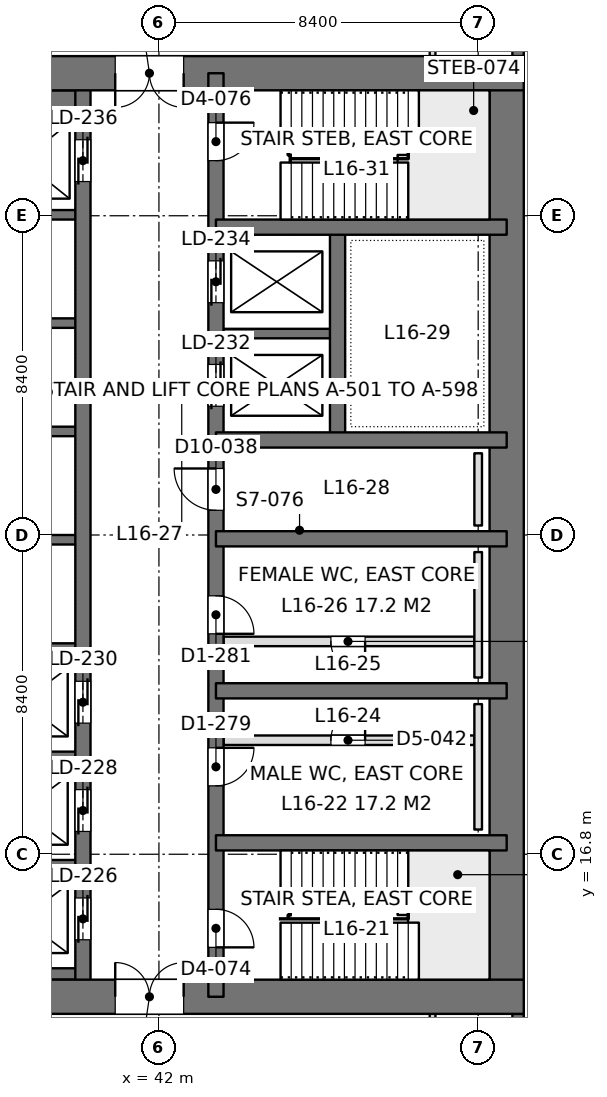
"""IFC4 building model, lengths in metres.
Left out: names, types, materials, properties, quantities, classifications, styles, units other than length and angle.
Written with IfcOpenShell. Run it as: python <this file> out.ifc"""

import sys

from ifc_helpers import new_model, si_unit, direction, frame, frame_2d, origin, place, context, subcontext, project, spatial, rectangle, extrude, element, fill, save


model = new_model("IFC4")
c1 = context("Model", 3, precision=1e-05, world=origin(), true_north=direction((0.0, 1.0)))
c2 = subcontext(c1, "Body", "Model", "MODEL_VIEW")
j1 = project(units=[si_unit("LENGTHUNIT", "METRE"), si_unit("PLANEANGLEUNIT", "RADIAN")], contexts=[c1])
p1 = place(None, origin())
s1 = spatial("IfcSite", under=j1, at=p1, CompositionType="ELEMENT")
p2 = place(p1, origin())
s2 = spatial("IfcBuilding", under=s1, at=p2, CompositionType="ELEMENT")
p3 = place(p2, frame((0.0, 0.0, 72.9)))
s3 = spatial("IfcBuildingStorey", under=s2, at=p3, CompositionType="ELEMENT", Elevation=72.9)
p4 = place(p3, frame((33.6, 13.05, 0.0), z_axis=(0.0, 0.0, 1.0), x_axis=(1.0, 0.0, 0.0)))
e1 = element("IfcWall", 1, at=p4, inside=s3, PredefinedType="SHEAR", context=c2, shape_type="SweptSolid", body=[
    extrude(rectangle(XDim=18.0, YDim=0.9, at=frame_2d((9.0, 0.0))), origin(), (0.0, 0.0, 1.0), 4.5),
])
p5 = place(p4, frame((7.25, 0.0, 0.0)))
e2 = element("IfcOpeningElement", 2, at=p5, cuts=e1, PredefinedType="OPENING", context=c2, shape_type="SweptSolid", body=[
    extrude(rectangle(XDim=1.8, YDim=2.4, at=frame_2d((0.9, 1.2))), frame((0.0, 0.46, 0.0), z_axis=(0.0, -1.0, 0.0), x_axis=(1.0, 0.0, 0.0)), (0.0, 0.0, 1.0), 0.92),
])
p6 = place(p3, frame((33.6, 37.35, 0.0), z_axis=(0.0, 0.0, 1.0), x_axis=(1.0, 0.0, 0.0)))
e3 = element("IfcWall", 3, at=p6, inside=s3, PredefinedType="SHEAR", context=c2, shape_type="SweptSolid", body=[
    extrude(rectangle(XDim=18.0, YDim=0.9, at=frame_2d((9.0, 0.0))), origin(), (0.0, 0.0, 1.0), 4.5),
])
p7 = place(p6, frame((7.25, 0.0, 0.0)))
e4 = element("IfcOpeningElement", 4, at=p7, cuts=e3, PredefinedType="OPENING", context=c2, shape_type="SweptSolid", body=[
    extrude(rectangle(XDim=1.8, YDim=2.4, at=frame_2d((0.9, 1.2))), frame((0.0, 0.46, 0.0), z_axis=(0.0, -1.0, 0.0), x_axis=(1.0, 0.0, 0.0)), (0.0, 0.0, 1.0), 0.92),
])
p8 = place(p3, frame((51.15, 13.05, 0.0), z_axis=(0.0, 0.0, 1.0), x_axis=(0.0, 1.0, 0.0)))
e5 = element("IfcWall", 5, at=p8, inside=s3, PredefinedType="SHEAR", context=c2, shape_type="SweptSolid", body=[
    extrude(rectangle(XDim=24.3, YDim=0.9, at=frame_2d((12.15, 0.0))), origin(), (0.0, 0.0, 1.0), 4.5),
])
p9 = place(p3, frame((43.5, 13.05, 0.0), z_axis=(0.0, 0.0, 1.0), x_axis=(0.0, 1.0, 0.0)))
e6 = element("IfcWall", 6, at=p9, inside=s3, PredefinedType="SHEAR", context=c2, shape_type="SweptSolid", body=[
    extrude(rectangle(XDim=24.3, YDim=0.4, at=frame_2d((12.15, 0.0))), origin(), (0.0, 0.0, 1.0), 4.5),
])
p10 = place(p9, frame((1.3, 0.0, 0.0)))
e7 = element("IfcOpeningElement", 7, at=p10, cuts=e6, PredefinedType="OPENING", context=c2, shape_type="SweptSolid", body=[
    extrude(rectangle(XDim=1.0, YDim=2.2, at=frame_2d((0.5, 1.1))), frame((0.0, 0.21, 0.0), z_axis=(0.0, -1.0, 0.0), x_axis=(1.0, 0.0, 0.0)), (0.0, 0.0, 1.0), 0.42),
])
p11 = place(p9, frame((22.0, 0.0, 0.0)))
e8 = element("IfcOpeningElement", 8, at=p11, cuts=e6, PredefinedType="OPENING", context=c2, shape_type="SweptSolid", body=[
    extrude(rectangle(XDim=1.0, YDim=2.2, at=frame_2d((0.5, 1.1))), frame((0.0, 0.21, 0.0), z_axis=(0.0, -1.0, 0.0), x_axis=(1.0, 0.0, 0.0)), (0.0, 0.0, 1.0), 0.42),
])
p12 = place(p9, frame((5.55, 0.0, 0.0)))
e9 = element("IfcOpeningElement", 9, at=p12, cuts=e6, PredefinedType="OPENING", context=c2, shape_type="SweptSolid", body=[
    extrude(rectangle(XDim=1.0, YDim=2.2, at=frame_2d((0.5, 1.1))), frame((0.0, 0.21, 0.0), z_axis=(0.0, -1.0, 0.0), x_axis=(1.0, 0.0, 0.0)), (0.0, 0.0, 1.0), 0.42),
])
p13 = place(p9, frame((9.55, 0.0, 0.0)))
e10 = element("IfcOpeningElement", 10, at=p13, cuts=e6, PredefinedType="OPENING", context=c2, shape_type="SweptSolid", body=[
    extrude(rectangle(XDim=1.0, YDim=2.2, at=frame_2d((0.5, 1.1))), frame((0.0, 0.21, 0.0), z_axis=(0.0, -1.0, 0.0), x_axis=(1.0, 0.0, 0.0)), (0.0, 0.0, 1.0), 0.42),
])
p14 = place(p9, frame((12.8, 0.0, 0.0)))
e11 = element("IfcOpeningElement", 11, at=p14, cuts=e6, PredefinedType="OPENING", context=c2, shape_type="SweptSolid", body=[
    extrude(rectangle(XDim=1.1, YDim=2.2, at=frame_2d((0.55, 1.1))), frame((0.0, 0.21, 0.0), z_axis=(0.0, -1.0, 0.0), x_axis=(1.0, 0.0, 0.0)), (0.0, 0.0, 1.0), 0.42),
])
p15 = place(p9, frame((15.538, 0.0, 0.0)))
e12 = element("IfcOpeningElement", 12, at=p15, cuts=e6, PredefinedType="OPENING", context=c2, shape_type="SweptSolid", body=[
    extrude(rectangle(XDim=1.1, YDim=2.2, at=frame_2d((0.55, 1.1))), frame((0.0, 0.21, 0.0), z_axis=(0.0, -1.0, 0.0), x_axis=(1.0, 0.0, 0.0)), (0.0, 0.0, 1.0), 0.42),
])
p16 = place(p9, frame((18.262, 0.0, 0.0)))
e13 = element("IfcOpeningElement", 13, at=p16, cuts=e6, PredefinedType="OPENING", context=c2, shape_type="SweptSolid", body=[
    extrude(rectangle(XDim=1.1, YDim=2.2, at=frame_2d((0.55, 1.1))), frame((0.0, 0.21, 0.0), z_axis=(0.0, -1.0, 0.0), x_axis=(1.0, 0.0, 0.0)), (0.0, 0.0, 1.0), 0.42),
])
p17 = place(p3, frame((40.0, 13.05, 0.0), z_axis=(0.0, 0.0, 1.0), x_axis=(0.0, 1.0, 0.0)))
e14 = element("IfcWall", 14, at=p17, inside=s3, PredefinedType="SHEAR", context=c2, shape_type="SweptSolid", body=[
    extrude(rectangle(XDim=24.3, YDim=0.4, at=frame_2d((12.15, 0.0))), origin(), (0.0, 0.0, 1.0), 4.5),
])
p18 = place(p17, frame((1.5, 0.0, 0.0)))
e15 = element("IfcOpeningElement", 15, at=p18, cuts=e14, PredefinedType="OPENING", context=c2, shape_type="SweptSolid", body=[
    extrude(rectangle(XDim=1.1, YDim=2.2, at=frame_2d((0.55, 1.1))), frame((0.0, 0.21, 0.0), z_axis=(0.0, -1.0, 0.0), x_axis=(1.0, 0.0, 0.0)), (0.0, 0.0, 1.0), 0.42),
])
p19 = place(p17, frame((4.35, 0.0, 0.0)))
e16 = element("IfcOpeningElement", 16, at=p19, cuts=e14, PredefinedType="OPENING", context=c2, shape_type="SweptSolid", body=[
    extrude(rectangle(XDim=1.1, YDim=2.2, at=frame_2d((0.55, 1.1))), frame((0.0, 0.21, 0.0), z_axis=(0.0, -1.0, 0.0), x_axis=(1.0, 0.0, 0.0)), (0.0, 0.0, 1.0), 0.42),
])
p20 = place(p17, frame((7.2, 0.0, 0.0)))
e17 = element("IfcOpeningElement", 17, at=p20, cuts=e14, PredefinedType="OPENING", context=c2, shape_type="SweptSolid", body=[
    extrude(rectangle(XDim=1.1, YDim=2.2, at=frame_2d((0.55, 1.1))), frame((0.0, 0.21, 0.0), z_axis=(0.0, -1.0, 0.0), x_axis=(1.0, 0.0, 0.0)), (0.0, 0.0, 1.0), 0.42),
])
p21 = place(p17, frame((21.45, 0.0, 0.0)))
e18 = element("IfcOpeningElement", 18, at=p21, cuts=e14, PredefinedType="OPENING", context=c2, shape_type="SweptSolid", body=[
    extrude(rectangle(XDim=1.1, YDim=2.2, at=frame_2d((0.55, 1.1))), frame((0.0, 0.21, 0.0), z_axis=(0.0, -1.0, 0.0), x_axis=(1.0, 0.0, 0.0)), (0.0, 0.0, 1.0), 0.42),
])
for number, where, z_axis, x_axis in (
    (19, (51.15, 17.1, 0.0), (0.0, 0.0, 1.0), (-1.0, 0.0, 0.0)),
    (20, (51.15, 21.1, 0.0), (0.0, 0.0, 1.0), (-1.0, 0.0, 0.0)),
    (21, (51.15, 25.1, 0.0), (0.0, 0.0, 1.0), (-1.0, 0.0, 0.0)),
    (22, (51.15, 27.7, 0.0), (0.0, 0.0, 1.0), (-1.0, 0.0, 0.0)),
    (23, (51.15, 33.3, 0.0), (0.0, 0.0, 1.0), (-1.0, 0.0, 0.0)),
):
    element("IfcWall", number, at=place(p3, frame(where, z_axis=z_axis, x_axis=x_axis)), inside=s3, PredefinedType="SHEAR", context=c2, shape_type="SweptSolid", body=[
        extrude(rectangle(XDim=7.65, YDim=0.4, at=frame_2d((3.825, 0.0))), origin(), (0.0, 0.0, 1.0), 4.5),
    ])
p22 = place(p3, frame((46.7, 27.7, 0.0), z_axis=(0.0, 0.0, 1.0), x_axis=(0.0, 1.0, 0.0)))
e24 = element("IfcWall", 24, at=p22, inside=s3, PredefinedType="SHEAR", context=c2, shape_type="SweptSolid", body=[
    extrude(rectangle(XDim=5.6, YDim=0.4, at=frame_2d((2.8, 0.0))), origin(), (0.0, 0.0, 1.0), 4.5),
])
p23 = place(p3, frame((46.7, 30.5, 0.0), z_axis=(0.0, 0.0, 1.0), x_axis=(-1.0, 0.0, 0.0)))
e25 = element("IfcWall", 25, at=p23, inside=s3, PredefinedType="SHEAR", context=c2, shape_type="SweptSolid", body=[
    extrude(rectangle(XDim=3.2, YDim=0.25, at=frame_2d((1.6, 0.0))), origin(), (0.0, 0.0, 1.0), 4.5),
])
p24 = place(p3, frame((40.0, 13.65, 0.0), z_axis=(0.0, 0.0, 1.0), x_axis=(-1.0, 0.0, 0.0)))
e26 = element("IfcWall", 26, at=p24, inside=s3, PredefinedType="SHEAR", context=c2, shape_type="SweptSolid", body=[
    extrude(rectangle(XDim=3.2, YDim=0.3, at=frame_2d((1.6, 0.0))), origin(), (0.0, 0.0, 1.0), 4.5),
])
for number, where, z_axis, x_axis in (
    (27, (40.0, 16.525, 0.0), (0.0, 0.0, 1.0), (-1.0, 0.0, 0.0)),
    (28, (40.0, 19.375, 0.0), (0.0, 0.0, 1.0), (-1.0, 0.0, 0.0)),
    (29, (40.0, 22.225, 0.0), (0.0, 0.0, 1.0), (-1.0, 0.0, 0.0)),
    (30, (40.0, 25.075, 0.0), (0.0, 0.0, 1.0), (-1.0, 0.0, 0.0)),
    (31, (40.0, 27.925, 0.0), (0.0, 0.0, 1.0), (-1.0, 0.0, 0.0)),
    (32, (40.0, 30.775, 0.0), (0.0, 0.0, 1.0), (-1.0, 0.0, 0.0)),
    (33, (40.0, 33.625, 0.0), (0.0, 0.0, 1.0), (-1.0, 0.0, 0.0)),
):
    element("IfcWall", number, at=place(p3, frame(where, z_axis=z_axis, x_axis=x_axis)), inside=s3, PredefinedType="SHEAR", context=c2, shape_type="SweptSolid", body=[
        extrude(rectangle(XDim=3.2, YDim=0.25, at=frame_2d((1.6, 0.0))), origin(), (0.0, 0.0, 1.0), 4.5),
    ])
p25 = place(p3, frame((40.0, 36.625, 0.0), z_axis=(0.0, 0.0, 1.0), x_axis=(-1.0, 0.0, 0.0)))
e34 = element("IfcWall", 34, at=p25, inside=s3, PredefinedType="SHEAR", context=c2, shape_type="SweptSolid", body=[
    extrude(rectangle(XDim=3.2, YDim=0.55, at=frame_2d((1.6, 0.0))), origin(), (0.0, 0.0, 1.0), 4.5),
])
p26 = place(p3, frame((51.45, 42.0, 0.0), z_axis=(0.0, 0.0, 1.0), x_axis=(0.0, -1.0, 0.0)))
e35 = element("IfcWall", 35, at=p26, inside=s3, PredefinedType="SOLIDWALL", context=c2, shape_type="SweptSolid", body=[
    extrude(rectangle(XDim=4.2, YDim=0.3, at=frame_2d((2.1, 0.0))), origin(), (0.0, 0.0, 1.0), 4.34),
])
p27 = place(p26, frame((0.9, 0.0, 0.9)))
e36 = element("IfcOpeningElement", 36, at=p27, cuts=e35, PredefinedType="OPENING", context=c2, shape_type="SweptSolid", body=[
    extrude(rectangle(XDim=2.4, YDim=1.9, at=frame_2d((1.2, 0.95))), frame((0.0, 0.16, 0.0), z_axis=(0.0, -1.0, 0.0), x_axis=(1.0, 0.0, 0.0)), (0.0, 0.0, 1.0), 0.32),
])
p28 = place(p3, frame((51.45, 12.6, 0.0), z_axis=(0.0, 0.0, 1.0), x_axis=(0.0, -1.0, 0.0)))
e37 = element("IfcWall", 37, at=p28, inside=s3, PredefinedType="SOLIDWALL", context=c2, shape_type="SweptSolid", body=[
    extrude(rectangle(XDim=4.2, YDim=0.3, at=frame_2d((2.1, 0.0))), origin(), (0.0, 0.0, 1.0), 4.34),
])
p29 = place(p28, frame((0.9, 0.0, 0.9)))
e38 = element("IfcOpeningElement", 38, at=p29, cuts=e37, PredefinedType="OPENING", context=c2, shape_type="SweptSolid", body=[
    extrude(rectangle(XDim=2.4, YDim=1.9, at=frame_2d((1.2, 0.95))), frame((0.0, 0.16, 0.0), z_axis=(0.0, -1.0, 0.0), x_axis=(1.0, 0.0, 0.0)), (0.0, 0.0, 1.0), 0.32),
])
p30 = place(p3, frame((49.2, 10.8, 0.0), z_axis=(0.0, 0.0, 1.0), x_axis=(0.0, 1.0, 0.0)))
e39 = element("IfcWall", 39, at=p30, inside=s3, PredefinedType="PARTITIONING", context=c2, shape_type="SweptSolid", body=[
    extrude(rectangle(XDim=1.802, YDim=0.15, at=frame_2d((0.901, 0.0))), origin(), (0.0, 0.0, 1.0), 4.34),
])
p31 = place(p3, frame((49.2, 37.8, 0.0), z_axis=(0.0, 0.0, 1.0), x_axis=(0.0, 1.0, 0.0)))
e40 = element("IfcWall", 40, at=p31, inside=s3, PredefinedType="PARTITIONING", context=c2, shape_type="SweptSolid", body=[
    extrude(rectangle(XDim=1.8, YDim=0.15, at=frame_2d((0.9, 0.0))), origin(), (0.0, 0.0, 1.0), 4.34),
])
p32 = place(p3, frame((43.7, 22.4, 0.0), z_axis=(0.0, 0.0, 1.0), x_axis=(1.0, 0.0, 0.0)))
e41 = element("IfcWall", 41, at=p32, inside=s3, PredefinedType="PARTITIONING", context=c2, shape_type="SweptSolid", body=[
    extrude(rectangle(XDim=6.6, YDim=0.25, at=frame_2d((3.3, 0.0))), origin(), (0.0, 0.0, 1.0), 4.3),
])
p33 = place(p32, frame((2.825, 0.0, 0.0)))
e42 = element("IfcOpeningElement", 42, at=p33, cuts=e41, PredefinedType="OPENING", context=c2, shape_type="SweptSolid", body=[
    extrude(rectangle(XDim=0.9, YDim=2.2, at=frame_2d((0.45, 1.1))), frame((0.0, 0.135, 0.0), z_axis=(0.0, -1.0, 0.0), x_axis=(1.0, 0.0, 0.0)), (0.0, 0.0, 1.0), 0.27),
])
p34 = place(p3, frame((43.7, 19.8, 0.0), z_axis=(0.0, 0.0, 1.0), x_axis=(1.0, 0.0, 0.0)))
e43 = element("IfcWall", 43, at=p34, inside=s3, PredefinedType="PARTITIONING", context=c2, shape_type="SweptSolid", body=[
    extrude(rectangle(XDim=6.6, YDim=0.25, at=frame_2d((3.3, 0.0))), origin(), (0.0, 0.0, 1.0), 4.3),
])
p35 = place(p34, frame((2.825, 0.0, 0.0)))
e44 = element("IfcOpeningElement", 44, at=p35, cuts=e43, PredefinedType="OPENING", context=c2, shape_type="SweptSolid", body=[
    extrude(rectangle(XDim=0.9, YDim=2.2, at=frame_2d((0.45, 1.1))), frame((0.0, 0.135, 0.0), z_axis=(0.0, -1.0, 0.0), x_axis=(1.0, 0.0, 0.0)), (0.0, 0.0, 1.0), 0.27),
])
for number, where, z_axis, x_axis in (
    (45, (50.4, 17.45, 0.0), (0.0, 0.0, 1.0), (0.0, 1.0, 0.0)),
    (46, (50.4, 21.45, 0.0), (0.0, 0.0, 1.0), (0.0, 1.0, 0.0)),
):
    element("IfcWall", number, at=place(p3, frame(where, z_axis=z_axis, x_axis=x_axis)), inside=s3, PredefinedType="PLUMBINGWALL", context=c2, shape_type="SweptSolid", body=[
        extrude(rectangle(XDim=3.3, YDim=0.2, at=frame_2d((1.65, 0.0))), origin(), (0.0, 0.0, 1.0), 1.2),
    ])
p36 = place(p3, frame((50.4, 25.45, 0.0), z_axis=(0.0, 0.0, 1.0), x_axis=(0.0, 1.0, 0.0)))
e47 = element("IfcWall", 47, at=p36, inside=s3, PredefinedType="PLUMBINGWALL", context=c2, shape_type="SweptSolid", body=[
    extrude(rectangle(XDim=1.9, YDim=0.2, at=frame_2d((0.95, 0.0))), origin(), (0.0, 0.0, 1.0), 1.2),
])
p37 = place(p5, origin())
e48 = element("IfcDoor", 48, at=p37, inside=s3, OperationType="DOUBLE_DOOR_SINGLE_SWING", PredefinedType="DOOR", context=c2, shape_type="SweptSolid", body=[
    extrude(rectangle(XDim=1.8, YDim=2.4, at=frame_2d((0.9, 1.2))), frame((0.0, 0.025, 0.0), z_axis=(0.0, -1.0, 0.0), x_axis=(1.0, 0.0, 0.0)), (0.0, 0.0, 1.0), 0.05),
])
fill(e2, e48)
p38 = place(p7, frame((1.8, 0.0, 0.0), z_axis=(0.0, 0.0, 1.0), x_axis=(-1.0, 0.0, 0.0)))
e49 = element("IfcDoor", 49, at=p38, inside=s3, OperationType="DOUBLE_DOOR_SINGLE_SWING", PredefinedType="DOOR", context=c2, shape_type="SweptSolid", body=[
    extrude(rectangle(XDim=1.8, YDim=2.4, at=frame_2d((0.9, 1.2))), frame((0.0, 0.025, 0.0), z_axis=(0.0, -1.0, 0.0), x_axis=(1.0, 0.0, 0.0)), (0.0, 0.0, 1.0), 0.05),
])
fill(e4, e49)
p39 = place(p10, frame((1.0, 0.0, 0.0), z_axis=(0.0, 0.0, 1.0), x_axis=(-1.0, 0.0, 0.0)))
e50 = element("IfcDoor", 50, at=p39, inside=s3, OperationType="SINGLE_SWING_RIGHT", PredefinedType="DOOR", context=c2, shape_type="SweptSolid", body=[
    extrude(rectangle(XDim=1.0, YDim=2.2, at=frame_2d((0.5, 1.1))), frame((0.0, 0.025, 0.0), z_axis=(0.0, -1.0, 0.0), x_axis=(1.0, 0.0, 0.0)), (0.0, 0.0, 1.0), 0.05),
])
fill(e7, e50)
p40 = place(p11, frame((1.0, 0.0, 0.0), z_axis=(0.0, 0.0, 1.0), x_axis=(-1.0, 0.0, 0.0)))
e51 = element("IfcDoor", 51, at=p40, inside=s3, OperationType="SINGLE_SWING_LEFT", PredefinedType="DOOR", context=c2, shape_type="SweptSolid", body=[
    extrude(rectangle(XDim=1.0, YDim=2.2, at=frame_2d((0.5, 1.1))), frame((0.0, 0.025, 0.0), z_axis=(0.0, -1.0, 0.0), x_axis=(1.0, 0.0, 0.0)), (0.0, 0.0, 1.0), 0.05),
])
fill(e8, e51)
p41 = place(p12, frame((1.0, 0.0, 0.0), z_axis=(0.0, 0.0, 1.0), x_axis=(-1.0, 0.0, 0.0)))
e52 = element("IfcDoor", 52, at=p41, inside=s3, OperationType="SINGLE_SWING_LEFT", PredefinedType="DOOR", context=c2, shape_type="SweptSolid", body=[
    extrude(rectangle(XDim=1.0, YDim=2.2, at=frame_2d((0.5, 1.1))), frame((0.0, 0.025, 0.0), z_axis=(0.0, -1.0, 0.0), x_axis=(1.0, 0.0, 0.0)), (0.0, 0.0, 1.0), 0.05),
])
fill(e9, e52)
p42 = place(p13, frame((1.0, 0.0, 0.0), z_axis=(0.0, 0.0, 1.0), x_axis=(-1.0, 0.0, 0.0)))
e53 = element("IfcDoor", 53, at=p42, inside=s3, OperationType="SINGLE_SWING_RIGHT", PredefinedType="DOOR", context=c2, shape_type="SweptSolid", body=[
    extrude(rectangle(XDim=1.0, YDim=2.2, at=frame_2d((0.5, 1.1))), frame((0.0, 0.025, 0.0), z_axis=(0.0, -1.0, 0.0), x_axis=(1.0, 0.0, 0.0)), (0.0, 0.0, 1.0), 0.05),
])
fill(e10, e53)
p43 = place(p14, origin())
e54 = element("IfcDoor", 54, at=p43, inside=s3, OperationType="SINGLE_SWING_RIGHT", PredefinedType="DOOR", context=c2, shape_type="SweptSolid", body=[
    extrude(rectangle(XDim=1.1, YDim=2.2, at=frame_2d((0.55, 1.1))), frame((0.0, 0.025, 0.0), z_axis=(0.0, -1.0, 0.0), x_axis=(1.0, 0.0, 0.0)), (0.0, 0.0, 1.0), 0.05),
])
fill(e11, e54)
p44 = place(p18, origin())
e55 = element("IfcDoor", 55, at=p44, inside=s3, OperationType="DOUBLE_DOOR_SLIDING", PredefinedType="DOOR", context=c2, shape_type="SweptSolid", body=[
    extrude(rectangle(XDim=1.1, YDim=2.2, at=frame_2d((0.55, 1.1))), frame((0.0, 0.025, 0.0), z_axis=(0.0, -1.0, 0.0), x_axis=(1.0, 0.0, 0.0)), (0.0, 0.0, 1.0), 0.05),
])
fill(e15, e55)
p45 = place(p19, origin())
e56 = element("IfcDoor", 56, at=p45, inside=s3, OperationType="DOUBLE_DOOR_SLIDING", PredefinedType="DOOR", context=c2, shape_type="SweptSolid", body=[
    extrude(rectangle(XDim=1.1, YDim=2.2, at=frame_2d((0.55, 1.1))), frame((0.0, 0.025, 0.0), z_axis=(0.0, -1.0, 0.0), x_axis=(1.0, 0.0, 0.0)), (0.0, 0.0, 1.0), 0.05),
])
fill(e16, e56)
p46 = place(p20, origin())
e57 = element("IfcDoor", 57, at=p46, inside=s3, OperationType="DOUBLE_DOOR_SLIDING", PredefinedType="DOOR", context=c2, shape_type="SweptSolid", body=[
    extrude(rectangle(XDim=1.1, YDim=2.2, at=frame_2d((0.55, 1.1))), frame((0.0, 0.025, 0.0), z_axis=(0.0, -1.0, 0.0), x_axis=(1.0, 0.0, 0.0)), (0.0, 0.0, 1.0), 0.05),
])
fill(e17, e57)
p47 = place(p21, origin())
e58 = element("IfcDoor", 58, at=p47, inside=s3, OperationType="DOUBLE_DOOR_SLIDING", PredefinedType="DOOR", context=c2, shape_type="SweptSolid", body=[
    extrude(rectangle(XDim=1.1, YDim=2.2, at=frame_2d((0.55, 1.1))), frame((0.0, 0.025, 0.0), z_axis=(0.0, -1.0, 0.0), x_axis=(1.0, 0.0, 0.0)), (0.0, 0.0, 1.0), 0.05),
])
fill(e18, e58)
p48 = place(p15, origin())
e59 = element("IfcDoor", 59, at=p48, inside=s3, OperationType="DOUBLE_DOOR_SLIDING", PredefinedType="DOOR", context=c2, shape_type="SweptSolid", body=[
    extrude(rectangle(XDim=1.1, YDim=2.2, at=frame_2d((0.55, 1.1))), frame((0.0, 0.025, 0.0), z_axis=(0.0, -1.0, 0.0), x_axis=(1.0, 0.0, 0.0)), (0.0, 0.0, 1.0), 0.05),
])
fill(e12, e59)
p49 = place(p16, origin())
e60 = element("IfcDoor", 60, at=p49, inside=s3, OperationType="DOUBLE_DOOR_SLIDING", PredefinedType="DOOR", context=c2, shape_type="SweptSolid", body=[
    extrude(rectangle(XDim=1.1, YDim=2.2, at=frame_2d((0.55, 1.1))), frame((0.0, 0.025, 0.0), z_axis=(0.0, -1.0, 0.0), x_axis=(1.0, 0.0, 0.0)), (0.0, 0.0, 1.0), 0.05),
])
fill(e13, e60)
p50 = place(p33, frame((0.9, 0.0, 0.0), z_axis=(0.0, 0.0, 1.0), x_axis=(-1.0, 0.0, 0.0)))
e61 = element("IfcDoor", 61, at=p50, inside=s3, OperationType="SINGLE_SWING_LEFT", PredefinedType="DOOR", context=c2, shape_type="SweptSolid", body=[
    extrude(rectangle(XDim=0.9, YDim=2.2, at=frame_2d((0.45, 1.1))), frame((0.0, 0.025, 0.0), z_axis=(0.0, -1.0, 0.0), x_axis=(1.0, 0.0, 0.0)), (0.0, 0.0, 1.0), 0.05),
])
fill(e42, e61)
p51 = place(p35, origin())
e62 = element("IfcDoor", 62, at=p51, inside=s3, OperationType="SINGLE_SWING_RIGHT", PredefinedType="DOOR", context=c2, shape_type="SweptSolid", body=[
    extrude(rectangle(XDim=0.9, YDim=2.2, at=frame_2d((0.45, 1.1))), frame((0.0, 0.025, 0.0), z_axis=(0.0, -1.0, 0.0), x_axis=(1.0, 0.0, 0.0)), (0.0, 0.0, 1.0), 0.05),
])
fill(e44, e62)
save(model, sys.argv[1])
